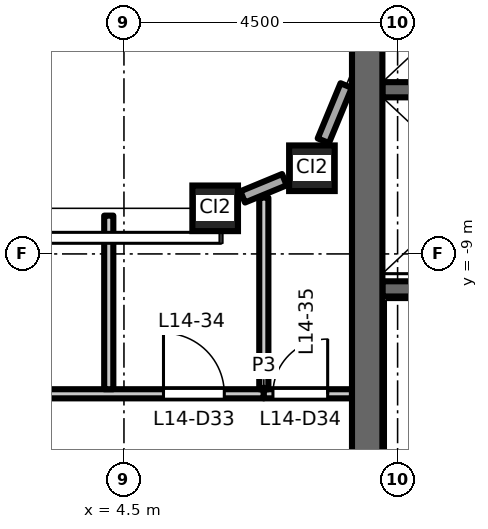
"""IFC4 building model, lengths in metres.
Left out: names, types, materials, properties, quantities, classifications, styles, units other than length and angle.
Written with IfcOpenShell. Run it as: python <this file> out.ifc"""

import sys

from ifc_helpers import new_model, si_unit, direction, frame, frame_2d, origin, origin_2d, place, context, subcontext, project, spatial, rectangle, hollow_rectangle, extrude, element, fill, save


model = new_model("IFC4")
c1 = context("Model", 3, precision=1e-05, world=origin(), true_north=direction((0.0, 1.0)))
c2 = subcontext(c1, "Body", "Model", "MODEL_VIEW")
j1 = project(units=[si_unit("LENGTHUNIT", "METRE"), si_unit("PLANEANGLEUNIT", "RADIAN")], contexts=[c1])
p1 = place(None, origin())
s1 = spatial("IfcSite", under=j1, at=p1, CompositionType="ELEMENT")
p2 = place(p1, origin())
s2 = spatial("IfcBuilding", under=s1, at=p2, CompositionType="ELEMENT")
p3 = place(p2, frame((0.0, 0.0, 67.2)))
s3 = spatial("IfcBuildingStorey", under=s2, at=p3, CompositionType="ELEMENT", Elevation=67.2)
for number, where, z_axis, x_axis in (
    (1, (6.0, -8.25, 0.0), (0.0, 0.0, 1.0), (1.0, 0.0, 0.0)),
    (2, (7.591, -7.591, 0.0), (0.0, 0.0, 1.0), (1.0, 0.0, 0.0)),
):
    element("IfcColumn", number, at=place(p3, frame(where, z_axis=z_axis, x_axis=x_axis)), inside=s3, PredefinedType="COLUMN", context=c2, shape_type="SweptSolid", body=[
        extrude(hollow_rectangle(XDim=0.75, YDim=0.75, WallThickness=0.045, at=origin_2d()), origin(), (0.0, 0.0, 1.0), 4.5),
    ])
p4 = place(p3, frame((8.75, -6.3, 0.0), z_axis=(0.0, 0.0, 1.0), x_axis=(1.0, 0.0, 0.0)))
e3 = element("IfcWall", 3, at=p4, inside=s3, PredefinedType="SHEAR", context=c2, shape_type="SweptSolid", body=[
    extrude(rectangle(XDim=3.1, YDim=0.25, at=frame_2d((1.55, 0.0))), origin(), (0.0, 0.0, 1.0), 4.35),
])
p5 = place(p3, frame((8.75, -9.575, 0.0), z_axis=(0.0, 0.0, 1.0), x_axis=(1.0, 0.0, 0.0)))
e4 = element("IfcWall", 4, at=p5, inside=s3, PredefinedType="SHEAR", context=c2, shape_type="SweptSolid", body=[
    extrude(rectangle(XDim=8.0, YDim=0.25, at=frame_2d((4.0, 0.0))), origin(), (0.0, 0.0, 1.0), 4.35),
])
p6 = place(p5, frame((6.65, 0.0, 0.0)))
e5 = element("IfcOpeningElement", 5, at=p6, cuts=e4, PredefinedType="OPENING", context=c2, shape_type="SweptSolid", body=[
    extrude(rectangle(XDim=1.1, YDim=2.1, at=frame_2d((0.55, 1.05))), frame((0.0, 0.135, 0.0), z_axis=(0.0, -1.0, 0.0), x_axis=(1.0, 0.0, 0.0)), (0.0, 0.0, 1.0), 0.27),
])
p7 = place(p3, frame((8.5, -13.0, 0.0), z_axis=(0.0, 0.0, 1.0), x_axis=(0.0, 1.0, 0.0)))
e6 = element("IfcWall", 6, at=p7, inside=s3, PredefinedType="SHEAR", context=c2, shape_type="SweptSolid", body=[
    extrude(rectangle(XDim=26.0, YDim=0.5, at=frame_2d((13.0, 0.0))), origin(), (0.0, 0.0, 1.0), 4.35),
])
p8 = place(p3, frame((6.453, -8.062, 0.0), z_axis=(0.0, 0.0, 1.0), x_axis=(0.923940677943, 0.382535780864, 0.0)))
e7 = element("IfcWall", 7, at=p8, inside=s3, PredefinedType="STANDARD", context=c2, shape_type="SweptSolid", body=[
    extrude(rectangle(XDim=0.742, YDim=0.2, at=frame_2d((0.371, 0.0))), origin(), (0.0, 0.0, 1.0), 3.73),
])
p9 = place(p3, frame((7.779, -7.138, 0.0), z_axis=(0.0, 0.0, 1.0), x_axis=(0.382549378284, 0.923935048136, 0.0)))
e8 = element("IfcWall", 8, at=p9, inside=s3, PredefinedType="STANDARD", context=c2, shape_type="SweptSolid", body=[
    extrude(rectangle(XDim=0.982, YDim=0.2, at=frame_2d((0.491, 0.0))), origin(), (0.0, 0.0, 1.0), 3.73),
])
p10 = place(p3, frame((-8.25, -11.3, 0.0), z_axis=(0.0, 0.0, 1.0), x_axis=(1.0, 0.0, 0.0)))
e9 = element("IfcWall", 9, at=p10, inside=s3, PredefinedType="PARTITIONING", context=c2, shape_type="SweptSolid", body=[
    extrude(rectangle(XDim=15.05, YDim=0.15, at=frame_2d((7.525, 0.0))), origin(), (0.0, 0.0, 1.0), 4.35),
])
p11 = place(p10, frame((4.6, 0.0, 0.0)))
e10 = element("IfcOpeningElement", 10, at=p11, cuts=e9, PredefinedType="OPENING", context=c2, shape_type="SweptSolid", body=[
    extrude(rectangle(XDim=1.0, YDim=2.1, at=frame_2d((0.5, 1.05))), frame((0.0, 0.085, 0.0), z_axis=(0.0, -1.0, 0.0), x_axis=(1.0, 0.0, 0.0)), (0.0, 0.0, 1.0), 0.17),
])
p12 = place(p10, frame((6.85, 0.0, 0.0)))
e11 = element("IfcOpeningElement", 11, at=p12, cuts=e9, PredefinedType="OPENING", context=c2, shape_type="SweptSolid", body=[
    extrude(rectangle(XDim=1.0, YDim=2.1, at=frame_2d((0.5, 1.05))), frame((0.0, 0.085, 0.0), z_axis=(0.0, -1.0, 0.0), x_axis=(1.0, 0.0, 0.0)), (0.0, 0.0, 1.0), 0.17),
])
p13 = place(p10, frame((13.4, 0.0, 0.0)))
e12 = element("IfcOpeningElement", 12, at=p13, cuts=e9, PredefinedType="OPENING", context=c2, shape_type="SweptSolid", body=[
    extrude(rectangle(XDim=1.0, YDim=2.1, at=frame_2d((0.5, 1.05))), frame((0.0, 0.085, 0.0), z_axis=(0.0, -1.0, 0.0), x_axis=(1.0, 0.0, 0.0)), (0.0, 0.0, 1.0), 0.17),
])
p14 = place(p3, frame((6.8, -11.3, 0.0), z_axis=(0.0, 0.0, 1.0), x_axis=(1.0, 0.0, 0.0)))
e13 = element("IfcWall", 13, at=p14, inside=s3, PredefinedType="PARTITIONING", context=c2, shape_type="SweptSolid", body=[
    extrude(rectangle(XDim=1.45, YDim=0.15, at=frame_2d((0.725, 0.0))), origin(), (0.0, 0.0, 1.0), 4.35),
])
p15 = place(p14, frame((0.15, 0.0, 0.0)))
e14 = element("IfcOpeningElement", 14, at=p15, cuts=e13, PredefinedType="OPENING", context=c2, shape_type="SweptSolid", body=[
    extrude(rectangle(XDim=0.9, YDim=2.1, at=frame_2d((0.45, 1.05))), frame((0.0, 0.085, 0.0), z_axis=(0.0, -1.0, 0.0), x_axis=(1.0, 0.0, 0.0)), (0.0, 0.0, 1.0), 0.17),
])
p16 = place(p3, frame((4.25, -11.225, 0.0), z_axis=(0.0, 0.0, 1.0), x_axis=(0.0, 1.0, 0.0)))
e15 = element("IfcWall", 15, at=p16, inside=s3, PredefinedType="PARTITIONING", context=c2, shape_type="SweptSolid", body=[
    extrude(rectangle(XDim=2.855, YDim=0.15, at=frame_2d((1.427, 0.0))), origin(), (0.0, 0.0, 1.0), 4.35),
])
p17 = place(p3, frame((6.8, -11.225, 0.0), z_axis=(0.0, 0.0, 1.0), x_axis=(0.0, 1.0, 0.0)))
e16 = element("IfcWall", 16, at=p17, inside=s3, PredefinedType="PARTITIONING", context=c2, shape_type="SweptSolid", body=[
    extrude(rectangle(XDim=3.151, YDim=0.15, at=frame_2d((1.576, 0.0))), origin(), (0.0, 0.0, 1.0), 4.35),
])
p18 = place(p13, origin())
e17 = element("IfcDoor", 17, at=p18, inside=s3, OperationType="SINGLE_SWING_LEFT", PredefinedType="DOOR", context=c2, shape_type="SweptSolid", body=[
    extrude(rectangle(XDim=1.0, YDim=2.1, at=frame_2d((0.5, 1.05))), frame((0.0, 0.025, 0.0), z_axis=(0.0, -1.0, 0.0), x_axis=(1.0, 0.0, 0.0)), (0.0, 0.0, 1.0), 0.05),
])
fill(e12, e17)
p19 = place(p15, origin())
e18 = element("IfcDoor", 18, at=p19, inside=s3, OperationType="SINGLE_SWING_RIGHT", PredefinedType="DOOR", context=c2, shape_type="SweptSolid", body=[
    extrude(rectangle(XDim=0.9, YDim=2.1, at=frame_2d((0.45, 1.05))), frame((0.0, 0.025, 0.0), z_axis=(0.0, -1.0, 0.0), x_axis=(1.0, 0.0, 0.0)), (0.0, 0.0, 1.0), 0.05),
])
fill(e14, e18)
save(model, sys.argv[1])
